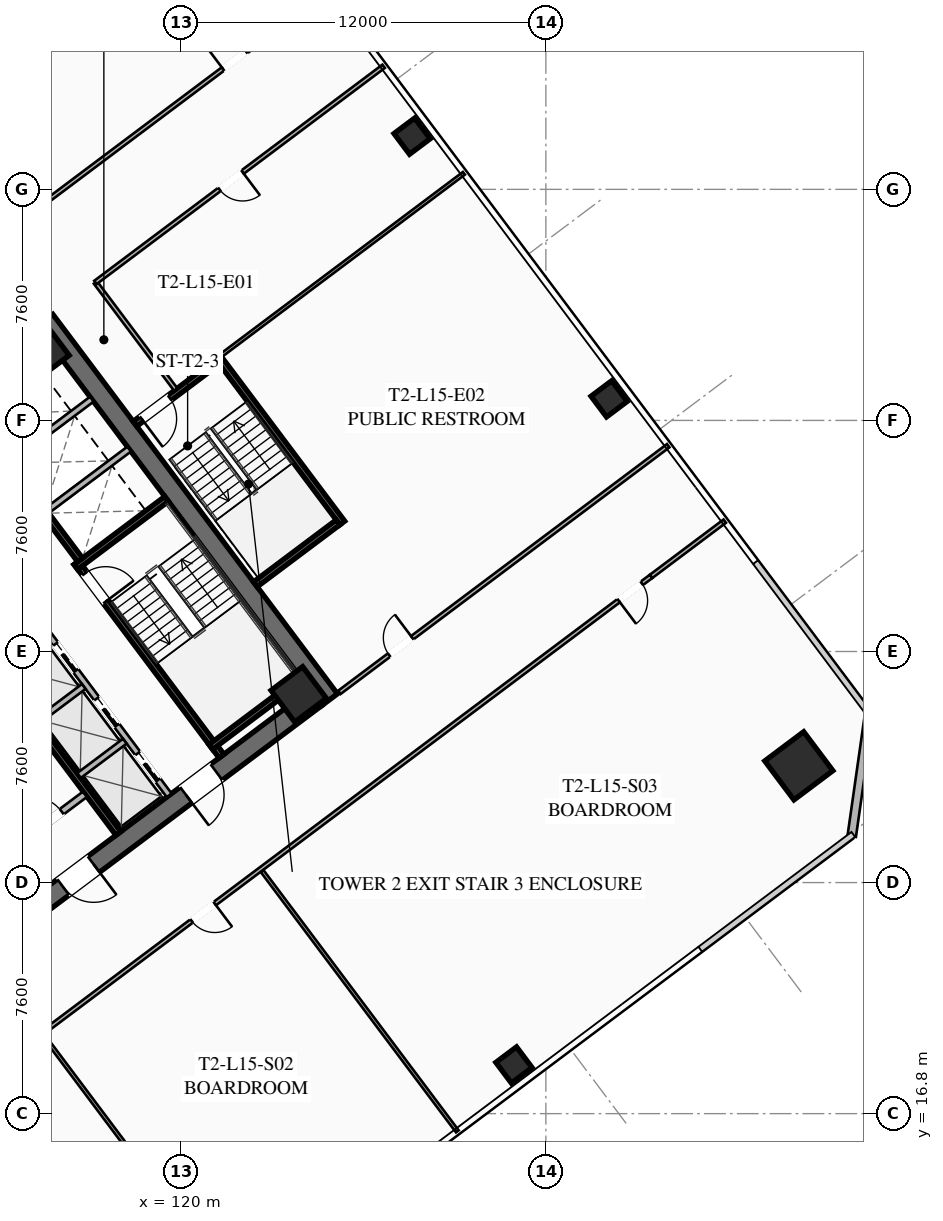
"""IFC4 building model, lengths in metres.
Left out: names, types, materials, properties, quantities, classifications, styles, units other than length and angle.
Written with IfcOpenShell. Run it as: python <this file> out.ifc"""

import sys

from ifc_helpers import new_model, si_unit, direction, frame, frame_2d, origin, origin_2d, place, context, subcontext, project, spatial, rectangle, hollow_rectangle, extrude, element, fill, save


model = new_model("IFC4")
c1 = context("Model", 3, precision=1e-05, world=origin(), true_north=direction((0.0, 1.0)))
c2 = subcontext(c1, "Body", "Model", "MODEL_VIEW")
j1 = project(units=[si_unit("LENGTHUNIT", "METRE"), si_unit("PLANEANGLEUNIT", "RADIAN")], contexts=[c1])
p1 = place(None, origin())
s1 = spatial("IfcSite", under=j1, at=p1, CompositionType="ELEMENT")
p2 = place(p1, origin())
s2 = spatial("IfcBuilding", under=s1, at=p2, CompositionType="ELEMENT")
p3 = place(p2, frame((0.0, 0.0, 60.1)))
s3 = spatial("IfcBuildingStorey", under=s2, at=p3, CompositionType="ELEMENT", Elevation=60.1)
p4 = place(p3, frame((115.524, 42.893, 0.0), z_axis=(0.0, 0.0, 1.0), x_axis=(0.600005007985, -0.799996243986, 0.0)))
e1 = element("IfcWall", 1, at=p4, inside=s3, PredefinedType="SHEAR", context=c2, shape_type="SweptSolid", body=[
    extrude(rectangle(XDim=15.6, YDim=0.65, at=frame_2d((7.8, 0.0))), origin(), (0.0, 0.0, 1.0), 3.55),
])
p5 = place(p3, frame((124.429, 30.478, 0.0), z_axis=(0.0, 0.0, 1.0), x_axis=(-0.799998028465, -0.600002628705, 0.0)))
e2 = element("IfcWall", 2, at=p5, inside=s3, PredefinedType="SHEAR", context=c2, shape_type="SweptSolid", body=[
    extrude(rectangle(XDim=14.86, YDim=0.65, at=frame_2d((7.43, 0.0))), origin(), (0.0, 0.0, 1.0), 3.55),
])
p6 = place(p5, frame((9.13, 0.0, 0.0)))
e3 = element("IfcOpeningElement", 3, at=p6, cuts=e2, PredefinedType="OPENING", context=c2, shape_type="SweptSolid", body=[
    extrude(rectangle(XDim=1.25, YDim=2.25, at=frame_2d((0.625, 1.125))), frame((0.0, 0.335, 0.0), z_axis=(0.0, -1.0, 0.0), x_axis=(1.0, 0.0, 0.0)), (0.0, 0.0, 1.0), 0.67),
])
p7 = place(p5, frame((4.08, 0.0, 0.0)))
e4 = element("IfcOpeningElement", 4, at=p7, cuts=e2, PredefinedType="OPENING", context=c2, shape_type="SweptSolid", body=[
    extrude(rectangle(XDim=1.25, YDim=2.25, at=frame_2d((0.625, 1.125))), frame((0.0, 0.335, 0.0), z_axis=(0.0, -1.0, 0.0), x_axis=(1.0, 0.0, 0.0)), (0.0, 0.0, 1.0), 0.67),
])
for number, where, z_axis, x_axis in (
    (5, (123.87, 30.59, 0.0), (0.0, 0.0, 1.0), (0.8, 0.6, 0.0)),
    (6, (115.41, 41.87, 0.0), (0.0, 0.0, 1.0), (0.8, 0.6, 0.0)),
):
    element("IfcColumn", number, at=place(p3, frame(where, z_axis=z_axis, x_axis=x_axis)), inside=s3, PredefinedType="COLUMN", context=c2, shape_type="SweptSolid", body=[
        extrude(hollow_rectangle(XDim=1.3, YDim=1.3, WallThickness=0.05, at=origin_2d()), origin(), (0.0, 0.0, 1.0), 3.35),
    ])
p8 = place(p3, frame((140.32, 28.24, 0.0), z_axis=(0.0, 0.0, 1.0), x_axis=(0.799999996291, 0.600000004945, 0.0)))
e7 = element("IfcColumn", 7, at=p8, inside=s3, PredefinedType="COLUMN", context=c2, shape_type="SweptSolid", body=[
    extrude(hollow_rectangle(XDim=1.6, YDim=1.6, WallThickness=0.06, at=origin_2d()), origin(), (0.0, 0.0, 1.0), 3.35),
])
for number, where, z_axis, x_axis in (
    (8, (130.95, 18.4, 0.0), (0.0, 0.0, 1.0), (0.8, 0.6, 0.0)),
    (9, (134.08, 40.31, 0.0), (0.0, 0.0, 1.0), (0.8, 0.6, 0.0)),
    (10, (127.6, 48.95, 0.0), (0.0, 0.0, 1.0), (0.8, 0.6, 0.0)),
):
    element("IfcColumn", number, at=place(p3, frame(where, z_axis=z_axis, x_axis=x_axis)), inside=s3, PredefinedType="COLUMN", context=c2, shape_type="SweptSolid", body=[
        extrude(hollow_rectangle(XDim=0.85, YDim=0.85, WallThickness=0.035, at=origin_2d()), origin(), (0.0, 0.0, 1.0), 3.35),
    ])
p9 = place(p3, frame((142.64, 29.98, 0.0), z_axis=(0.0, 0.0, 1.0), x_axis=(-0.14137968631, -0.989955445613, 0.0)))
e11 = element("IfcWall", 11, at=p9, inside=s3, PredefinedType="SOLIDWALL", context=c2, shape_type="SweptSolid", body=[
    extrude(rectangle(XDim=4.101, YDim=0.28, at=frame_2d((2.051, 0.0))), origin(), (0.0, 0.0, 1.0), 3.35),
])
p10 = place(p3, frame((116.56, 34.92, 0.0), z_axis=(0.0, 0.0, 1.0), x_axis=(0.600009827119, -0.799992629566, 0.0)))
e12 = element("IfcWall", 12, at=p10, inside=s3, PredefinedType="SHEAR", context=c2, shape_type="SweptSolid", body=[
    extrude(rectangle(XDim=7.95, YDim=0.2, at=frame_2d((3.975, 0.0))), origin(), (0.0, 0.0, 1.0), 3.35),
])
p11 = place(p10, frame((0.45, 0.0, 0.0)))
e13 = element("IfcOpeningElement", 13, at=p11, cuts=e12, PredefinedType="OPENING", context=c2, shape_type="SweptSolid", body=[
    extrude(rectangle(XDim=1.15, YDim=2.2, at=frame_2d((0.575, 1.1))), frame((0.0, 0.11, 0.0), z_axis=(0.0, -1.0, 0.0), x_axis=(1.0, 0.0, 0.0)), (0.0, 0.0, 1.0), 0.22),
])
for number, where, z_axis, x_axis in (
    (14, (116.54, 34.78, 0.0), (0.0, 0.0, 1.0), (0.8, 0.6, 0.0)),
    (15, (120.98, 28.86, 0.0), (0.0, 0.0, 1.0), (0.8, 0.6, 0.0)),
):
    element("IfcWall", number, at=place(p3, frame(where, z_axis=z_axis, x_axis=x_axis)), inside=s3, PredefinedType="SHEAR", context=c2, shape_type="SweptSolid", body=[
        extrude(rectangle(XDim=3.73, YDim=0.2, at=frame_2d((1.865, 0.0))), origin(), (0.0, 0.0, 1.0), 3.35),
    ])
p12 = place(p3, frame((117.938, 26.016, 0.0), z_axis=(0.0, 0.0, 1.0), x_axis=(-0.600005463273, 0.799995902516, 0.0)))
e16 = element("IfcWall", 16, at=p12, inside=s3, PredefinedType="SHEAR", context=c2, shape_type="SweptSolid", body=[
    extrude(rectangle(XDim=14.3, YDim=0.2, at=frame_2d((7.15, 0.0))), origin(), (0.0, 0.0, 1.0), 3.35),
])
p13 = place(p3, frame((114.316, 25.412, 0.0), z_axis=(0.0, 0.0, 1.0), x_axis=(0.800018601094, 0.59997519774, 0.0)))
e17 = element("IfcWall", 17, at=p13, inside=s3, PredefinedType="SOLIDWALL", context=c2, shape_type="SweptSolid", body=[
    extrude(rectangle(XDim=3.15, YDim=0.22, at=frame_2d((1.575, 0.0))), origin(), (0.0, 0.0, 1.0), 2.703),
])
p14 = place(p13, frame((0.95, 0.0, 0.0)))
e18 = element("IfcOpeningElement", 18, at=p14, cuts=e17, PredefinedType="OPENING", context=c2, shape_type="SweptSolid", body=[
    extrude(rectangle(XDim=1.25, YDim=2.25, at=frame_2d((0.625, 1.125))), frame((0.0, 0.12, 0.0), z_axis=(0.0, -1.0, 0.0), x_axis=(1.0, 0.0, 0.0)), (0.0, 0.0, 1.0), 0.24),
])
p15 = place(p3, frame((112.87, 40.09, 0.0), z_axis=(0.0, 0.0, 1.0), x_axis=(0.599975393228, -0.800018454488, 0.0)))
e19 = element("IfcWall", 19, at=p15, inside=s3, PredefinedType="SHEAR", context=c2, shape_type="SweptSolid", body=[
    extrude(rectangle(XDim=6.35, YDim=0.2, at=frame_2d((3.175, 0.0))), origin(), (0.0, 0.0, 1.0), 3.35),
])
for number, where, z_axis, x_axis in (
    (20, (115.59, 36.63, 0.0), (0.0, 0.0, 1.0), (0.8, 0.6, 0.0)),
    (21, (114.36, 38.27, 0.0), (0.0, 0.0, 1.0), (0.8, 0.6, 0.0)),
):
    element("IfcWall", number, at=place(p3, frame(where, z_axis=z_axis, x_axis=x_axis)), inside=s3, PredefinedType="SOLIDWALL", context=c2, shape_type="SweptSolid", body=[
        extrude(rectangle(XDim=3.38, YDim=0.2, at=frame_2d((1.69, 0.0))), origin(), (0.0, 0.0, 1.0), 3.35),
    ])
p16 = place(p3, frame((119.61, 27.27, 0.0), z_axis=(0.0, 0.0, 1.0), x_axis=(-0.600011488909, 0.79999138319, 0.0)))
e22 = element("IfcWall", 22, at=p16, inside=s3, PredefinedType="SOLIDWALL", context=c2, shape_type="SweptSolid", body=[
    extrude(rectangle(XDim=6.8, YDim=0.2, at=frame_2d((3.4, 0.0))), origin(), (0.0, 0.0, 1.0), 3.35),
])
p17 = place(p16, frame((0.625, 0.0, 0.0)))
e23 = element("IfcOpeningElement", 23, at=p17, cuts=e22, PredefinedType="OPENING", context=c2, shape_type="SweptSolid", body=[
    extrude(rectangle(XDim=1.1, YDim=2.2, at=frame_2d((0.55, 1.1))), frame((0.0, 0.11, 0.0), z_axis=(0.0, -1.0, 0.0), x_axis=(1.0, 0.0, 0.0)), (0.0, 0.0, 1.0), 0.22),
])
p18 = place(p16, frame((2.875, 0.0, 0.0)))
e24 = element("IfcOpeningElement", 24, at=p18, cuts=e22, PredefinedType="OPENING", context=c2, shape_type="SweptSolid", body=[
    extrude(rectangle(XDim=1.1, YDim=2.2, at=frame_2d((0.55, 1.1))), frame((0.0, 0.11, 0.0), z_axis=(0.0, -1.0, 0.0), x_axis=(1.0, 0.0, 0.0)), (0.0, 0.0, 1.0), 0.22),
])
p19 = place(p16, frame((5.125, 0.0, 0.0)))
e25 = element("IfcOpeningElement", 25, at=p19, cuts=e22, PredefinedType="OPENING", context=c2, shape_type="SweptSolid", body=[
    extrude(rectangle(XDim=1.1, YDim=2.2, at=frame_2d((0.55, 1.1))), frame((0.0, 0.11, 0.0), z_axis=(0.0, -1.0, 0.0), x_axis=(1.0, 0.0, 0.0)), (0.0, 0.0, 1.0), 0.22),
])
p20 = place(p3, frame((116.646, 27.922, 0.0), z_axis=(0.0, 0.0, 1.0), x_axis=(0.8, 0.6, 0.0)))
e26 = element("IfcWall", 26, at=p20, inside=s3, PredefinedType="SOLIDWALL", context=c2, shape_type="SweptSolid", body=[
    extrude(rectangle(XDim=1.88, YDim=0.2, at=frame_2d((0.94, 0.0))), origin(), (0.0, 0.0, 1.0), 3.35),
])
p21 = place(p3, frame((115.296, 29.722, 0.0), z_axis=(0.0, 0.0, 1.0), x_axis=(0.799984418148, 0.600020775241, 0.0)))
e27 = element("IfcWall", 27, at=p21, inside=s3, PredefinedType="SOLIDWALL", context=c2, shape_type="SweptSolid", body=[
    extrude(rectangle(XDim=1.88, YDim=0.2, at=frame_2d((0.94, 0.0))), origin(), (0.0, 0.0, 1.0), 3.35),
])
p22 = place(p3, frame((125.304, 36.228, 0.0), z_axis=(0.0, 0.0, 1.0), x_axis=(-0.59998851072, 0.800008616831, 0.0)))
e28 = element("IfcWall", 28, at=p22, inside=s3, PredefinedType="SHEAR", context=c2, shape_type="SweptSolid", body=[
    extrude(rectangle(XDim=6.8, YDim=0.2, at=frame_2d((3.4, 0.0))), origin(), (0.0, 0.0, 1.0), 3.35),
])
p23 = place(p3, frame((121.204, 41.528, 0.0), z_axis=(0.0, 0.0, 1.0), x_axis=(-0.800017232136, -0.599977023131, 0.0)))
e29 = element("IfcWall", 29, at=p23, inside=s3, PredefinedType="SHEAR", context=c2, shape_type="SweptSolid", body=[
    extrude(rectangle(XDim=3.4, YDim=0.2, at=frame_2d((1.7, 0.0))), origin(), (0.0, 0.0, 1.0), 3.35),
])
p24 = place(p23, frame((1.975, 0.0, 0.0)))
e30 = element("IfcOpeningElement", 30, at=p24, cuts=e29, PredefinedType="OPENING", context=c2, shape_type="SweptSolid", body=[
    extrude(rectangle(XDim=1.15, YDim=2.2, at=frame_2d((0.575, 1.1))), frame((0.0, 0.11, 0.0), z_axis=(0.0, -1.0, 0.0), x_axis=(1.0, 0.0, 0.0)), (0.0, 0.0, 1.0), 0.22),
])
p25 = place(p3, frame((122.444, 34.208, 0.0), z_axis=(0.0, 0.0, 1.0), x_axis=(0.79999138319, 0.600011488909, 0.0)))
e31 = element("IfcWall", 31, at=p25, inside=s3, PredefinedType="SHEAR", context=c2, shape_type="SweptSolid", body=[
    extrude(rectangle(XDim=3.4, YDim=0.2, at=frame_2d((1.7, 0.0))), origin(), (0.0, 0.0, 1.0), 3.35),
])
p26 = place(p3, frame((119.824, 40.618, 0.0), z_axis=(0.0, 0.0, 1.0), x_axis=(-0.599982243973, 0.800013316712, 0.0)))
e32 = element("IfcWall", 32, at=p26, inside=s3, PredefinedType="PARTITIONING", context=c2, shape_type="SweptSolid", body=[
    extrude(rectangle(XDim=4.4, YDim=0.135, at=frame_2d((2.2, 0.0))), origin(), (0.0, 0.0, 1.0), 2.703),
])
p27 = place(p3, frame((98.396, 33.922, 0.0), z_axis=(0.0, 0.0, 1.0), x_axis=(0.800001954438, 0.599997394074, 0.0)))
e33 = element("IfcWall", 33, at=p27, inside=s3, PredefinedType="PARTITIONING", context=c2, shape_type="SweptSolid", body=[
    extrude(rectangle(XDim=29.98, YDim=0.135, at=frame_2d((14.99, 0.0))), origin(), (0.0, 0.0, 1.0), 2.703),
])
p28 = place(p27, frame((0.3, 0.0, 0.0)))
e34 = element("IfcOpeningElement", 34, at=p28, cuts=e33, PredefinedType="OPENING", context=c2, shape_type="SweptSolid", body=[
    extrude(rectangle(XDim=0.95, YDim=2.05, at=frame_2d((0.475, 1.025))), frame((0.0, 0.077, 0.0), z_axis=(0.0, -1.0, 0.0), x_axis=(1.0, 0.0, 0.0)), (0.0, 0.0, 1.0), 0.155),
])
p29 = place(p27, frame((11.143, 0.0, 0.0)))
e35 = element("IfcOpeningElement", 35, at=p29, cuts=e33, PredefinedType="OPENING", context=c2, shape_type="SweptSolid", body=[
    extrude(rectangle(XDim=0.95, YDim=2.05, at=frame_2d((0.475, 1.025))), frame((0.0, 0.077, 0.0), z_axis=(0.0, -1.0, 0.0), x_axis=(1.0, 0.0, 0.0)), (0.0, 0.0, 1.0), 0.155),
])
p30 = place(p27, frame((28.73, 0.0, 0.0)))
e36 = element("IfcOpeningElement", 36, at=p30, cuts=e33, PredefinedType="OPENING", context=c2, shape_type="SweptSolid", body=[
    extrude(rectangle(XDim=0.95, YDim=2.05, at=frame_2d((0.475, 1.025))), frame((0.0, 0.077, 0.0), z_axis=(0.0, -1.0, 0.0), x_axis=(1.0, 0.0, 0.0)), (0.0, 0.0, 1.0), 0.155),
])
p31 = place(p3, frame((135.46, 34.47, 0.0), z_axis=(0.0, 0.0, 1.0), x_axis=(-0.799998045563, -0.600002605907, 0.0)))
e37 = element("IfcWall", 37, at=p31, inside=s3, PredefinedType="PARTITIONING", context=c2, shape_type="SweptSolid", body=[
    extrude(rectangle(XDim=29.98, YDim=0.135, at=frame_2d((14.99, 0.0))), origin(), (0.0, 0.0, 1.0), 2.703),
])
p32 = place(p31, frame((28.65, 0.0, 0.0)))
e38 = element("IfcOpeningElement", 38, at=p32, cuts=e37, PredefinedType="OPENING", context=c2, shape_type="SweptSolid", body=[
    extrude(rectangle(XDim=0.95, YDim=2.05, at=frame_2d((0.475, 1.025))), frame((0.0, 0.077, 0.0), z_axis=(0.0, -1.0, 0.0), x_axis=(1.0, 0.0, 0.0)), (0.0, 0.0, 1.0), 0.155),
])
p33 = place(p31, frame((17.938, 0.0, 0.0)))
e39 = element("IfcOpeningElement", 39, at=p33, cuts=e37, PredefinedType="OPENING", context=c2, shape_type="SweptSolid", body=[
    extrude(rectangle(XDim=0.95, YDim=2.05, at=frame_2d((0.475, 1.025))), frame((0.0, 0.077, 0.0), z_axis=(0.0, -1.0, 0.0), x_axis=(1.0, 0.0, 0.0)), (0.0, 0.0, 1.0), 0.155),
])
p34 = place(p31, frame((0.38, 0.0, 0.0)))
e40 = element("IfcOpeningElement", 40, at=p34, cuts=e37, PredefinedType="OPENING", context=c2, shape_type="SweptSolid", body=[
    extrude(rectangle(XDim=0.95, YDim=2.05, at=frame_2d((0.475, 1.025))), frame((0.0, 0.077, 0.0), z_axis=(0.0, -1.0, 0.0), x_axis=(1.0, 0.0, 0.0)), (0.0, 0.0, 1.0), 0.155),
])
p35 = place(p3, frame((135.46, 34.47, 0.0), z_axis=(0.0, 0.0, 1.0), x_axis=(0.799990331366, 0.600012891296, 0.0)))
e41 = element("IfcWall", 41, at=p35, inside=s3, PredefinedType="PARTITIONING", context=c2, shape_type="SweptSolid", body=[
    extrude(rectangle(XDim=3.03, YDim=0.135, at=frame_2d((1.515, 0.0))), origin(), (0.0, 0.0, 1.0), 2.703),
])
p36 = place(p3, frame((121.888, 10.816, 0.0), z_axis=(0.0, 0.0, 1.0), x_axis=(-0.599992698573, 0.800005476018, 0.0)))
e42 = element("IfcWall", 42, at=p36, inside=s3, PredefinedType="PARTITIONING", context=c2, shape_type="SweptSolid", body=[
    extrude(rectangle(XDim=10.7, YDim=0.11, at=frame_2d((5.35, 0.0))), origin(), (0.0, 0.0, 1.0), 2.703),
])
p37 = place(p3, frame((129.088, 16.216, 0.0), z_axis=(0.0, 0.0, 1.0), x_axis=(-0.600003650761, 0.799997261916, 0.0)))
e43 = element("IfcWall", 43, at=p37, inside=s3, PredefinedType="PARTITIONING", context=c2, shape_type="SweptSolid", body=[
    extrude(rectangle(XDim=10.7, YDim=0.11, at=frame_2d((5.35, 0.0))), origin(), (0.0, 0.0, 1.0), 2.703),
])
p38 = place(p3, frame((126.664, 51.248, 0.0), z_axis=(0.0, 0.0, 1.0), x_axis=(-0.799995055373, -0.600006592779, 0.0)))
e44 = element("IfcWall", 44, at=p38, inside=s3, PredefinedType="PARTITIONING", context=c2, shape_type="SweptSolid", body=[
    extrude(rectangle(XDim=11.85, YDim=0.135, at=frame_2d((5.925, 0.0))), origin(), (0.0, 0.0, 1.0), 2.703),
])
p39 = place(p38, frame((5.8, 0.0, 0.0)))
e45 = element("IfcOpeningElement", 45, at=p39, cuts=e44, PredefinedType="OPENING", context=c2, shape_type="SweptSolid", body=[
    extrude(rectangle(XDim=0.95, YDim=2.05, at=frame_2d((0.475, 1.025))), frame((0.0, 0.077, 0.0), z_axis=(0.0, -1.0, 0.0), x_axis=(1.0, 0.0, 0.0)), (0.0, 0.0, 1.0), 0.155),
])
p40 = place(p3, frame((125.208, 30.656, 0.0), z_axis=(0.0, 0.0, 1.0), x_axis=(0.799995666112, 0.600005778473, 0.0)))
e46 = element("IfcWall", 46, at=p40, inside=s3, PredefinedType="PARTITIONING", context=c2, shape_type="SweptSolid", body=[
    extrude(rectangle(XDim=13.52, YDim=0.135, at=frame_2d((6.76, 0.0))), origin(), (0.0, 0.0, 1.0), 2.703),
])
p41 = place(p40, frame((2.045, 0.0, 0.0)))
e47 = element("IfcOpeningElement", 47, at=p41, cuts=e46, PredefinedType="OPENING", context=c2, shape_type="SweptSolid", body=[
    extrude(rectangle(XDim=0.95, YDim=2.05, at=frame_2d((0.475, 1.025))), frame((0.0, 0.077, 0.0), z_axis=(0.0, -1.0, 0.0), x_axis=(1.0, 0.0, 0.0)), (0.0, 0.0, 1.0), 0.155),
])
p42 = place(p3, frame((129.304, 47.728, 0.0), z_axis=(0.0, 0.0, 1.0), x_axis=(-0.8, -0.6, 0.0)))
e48 = element("IfcWall", 48, at=p42, inside=s3, PredefinedType="PARTITIONING", context=c2, shape_type="SweptSolid", body=[
    extrude(rectangle(XDim=10.0, YDim=0.11, at=frame_2d((5.0, 0.0))), origin(), (0.0, 0.0, 1.0), 2.703),
])
p43 = place(p6, origin())
e49 = element("IfcDoor", 49, at=p43, inside=s3, OperationType="SINGLE_SWING_LEFT", PredefinedType="DOOR", context=c2, shape_type="SweptSolid", body=[
    extrude(rectangle(XDim=1.25, YDim=2.25, at=frame_2d((0.625, 1.125))), frame((0.0, 0.025, 0.0), z_axis=(0.0, -1.0, 0.0), x_axis=(1.0, 0.0, 0.0)), (0.0, 0.0, 1.0), 0.05),
])
fill(e3, e49)
p44 = place(p7, origin())
e50 = element("IfcDoor", 50, at=p44, inside=s3, OperationType="SINGLE_SWING_RIGHT", PredefinedType="DOOR", context=c2, shape_type="SweptSolid", body=[
    extrude(rectangle(XDim=1.25, YDim=2.25, at=frame_2d((0.625, 1.125))), frame((0.0, 0.025, 0.0), z_axis=(0.0, -1.0, 0.0), x_axis=(1.0, 0.0, 0.0)), (0.0, 0.0, 1.0), 0.05),
])
fill(e4, e50)
p45 = place(p11, origin())
e51 = element("IfcDoor", 51, at=p45, inside=s3, OperationType="SINGLE_SWING_RIGHT", PredefinedType="DOOR", context=c2, shape_type="SweptSolid", body=[
    extrude(rectangle(XDim=1.15, YDim=2.2, at=frame_2d((0.575, 1.1))), frame((0.0, 0.025, 0.0), z_axis=(0.0, -1.0, 0.0), x_axis=(1.0, 0.0, 0.0)), (0.0, 0.0, 1.0), 0.05),
])
fill(e13, e51)
p46 = place(p14, origin())
e52 = element("IfcDoor", 52, at=p46, inside=s3, OperationType="SINGLE_SWING_LEFT", PredefinedType="DOOR", context=c2, shape_type="SweptSolid", body=[
    extrude(rectangle(XDim=1.25, YDim=2.25, at=frame_2d((0.625, 1.125))), frame((0.0, 0.025, 0.0), z_axis=(0.0, -1.0, 0.0), x_axis=(1.0, 0.0, 0.0)), (0.0, 0.0, 1.0), 0.05),
])
fill(e18, e52)
p47 = place(p24, origin())
e53 = element("IfcDoor", 53, at=p47, inside=s3, OperationType="SINGLE_SWING_RIGHT", PredefinedType="DOOR", context=c2, shape_type="SweptSolid", body=[
    extrude(rectangle(XDim=1.15, YDim=2.2, at=frame_2d((0.575, 1.1))), frame((0.0, 0.025, 0.0), z_axis=(0.0, -1.0, 0.0), x_axis=(1.0, 0.0, 0.0)), (0.0, 0.0, 1.0), 0.05),
])
fill(e30, e53)
p48 = place(p30, origin())
e54 = element("IfcDoor", 54, at=p48, inside=s3, OperationType="SINGLE_SWING_LEFT", PredefinedType="DOOR", context=c2, shape_type="SweptSolid", body=[
    extrude(rectangle(XDim=0.95, YDim=2.05, at=frame_2d((0.475, 1.025))), frame((0.0, 0.025, 0.0), z_axis=(0.0, -1.0, 0.0), x_axis=(1.0, 0.0, 0.0)), (0.0, 0.0, 1.0), 0.05),
])
fill(e36, e54)
p49 = place(p33, origin())
e55 = element("IfcDoor", 55, at=p49, inside=s3, OperationType="SINGLE_SWING_LEFT", PredefinedType="DOOR", context=c2, shape_type="SweptSolid", body=[
    extrude(rectangle(XDim=0.95, YDim=2.05, at=frame_2d((0.475, 1.025))), frame((0.0, 0.025, 0.0), z_axis=(0.0, -1.0, 0.0), x_axis=(1.0, 0.0, 0.0)), (0.0, 0.0, 1.0), 0.05),
])
fill(e39, e55)
p50 = place(p34, origin())
e56 = element("IfcDoor", 56, at=p50, inside=s3, OperationType="SINGLE_SWING_RIGHT", PredefinedType="DOOR", context=c2, shape_type="SweptSolid", body=[
    extrude(rectangle(XDim=0.95, YDim=2.05, at=frame_2d((0.475, 1.025))), frame((0.0, 0.025, 0.0), z_axis=(0.0, -1.0, 0.0), x_axis=(1.0, 0.0, 0.0)), (0.0, 0.0, 1.0), 0.05),
])
fill(e40, e56)
p51 = place(p39, origin())
e57 = element("IfcDoor", 57, at=p51, inside=s3, OperationType="SINGLE_SWING_LEFT", PredefinedType="DOOR", context=c2, shape_type="SweptSolid", body=[
    extrude(rectangle(XDim=0.95, YDim=2.05, at=frame_2d((0.475, 1.025))), frame((0.0, 0.025, 0.0), z_axis=(0.0, -1.0, 0.0), x_axis=(1.0, 0.0, 0.0)), (0.0, 0.0, 1.0), 0.05),
])
fill(e45, e57)
p52 = place(p41, origin())
e58 = element("IfcDoor", 58, at=p52, inside=s3, OperationType="SINGLE_SWING_RIGHT", PredefinedType="DOOR", context=c2, shape_type="SweptSolid", body=[
    extrude(rectangle(XDim=0.95, YDim=2.05, at=frame_2d((0.475, 1.025))), frame((0.0, 0.025, 0.0), z_axis=(0.0, -1.0, 0.0), x_axis=(1.0, 0.0, 0.0)), (0.0, 0.0, 1.0), 0.05),
])
fill(e47, e58)
p53 = place(p17, origin())
e59 = element("IfcDoor", 59, at=p53, inside=s3, OperationType="SLIDING_TO_LEFT", PredefinedType="DOOR", context=c2, shape_type="SweptSolid", body=[
    extrude(rectangle(XDim=1.1, YDim=2.2, at=frame_2d((0.55, 1.1))), frame((0.0, 0.025, 0.0), z_axis=(0.0, -1.0, 0.0), x_axis=(1.0, 0.0, 0.0)), (0.0, 0.0, 1.0), 0.05),
])
fill(e23, e59)
p54 = place(p18, origin())
e60 = element("IfcDoor", 60, at=p54, inside=s3, OperationType="SLIDING_TO_LEFT", PredefinedType="DOOR", context=c2, shape_type="SweptSolid", body=[
    extrude(rectangle(XDim=1.1, YDim=2.2, at=frame_2d((0.55, 1.1))), frame((0.0, 0.025, 0.0), z_axis=(0.0, -1.0, 0.0), x_axis=(1.0, 0.0, 0.0)), (0.0, 0.0, 1.0), 0.05),
])
fill(e24, e60)
p55 = place(p19, origin())
e61 = element("IfcDoor", 61, at=p55, inside=s3, OperationType="SLIDING_TO_LEFT", PredefinedType="DOOR", context=c2, shape_type="SweptSolid", body=[
    extrude(rectangle(XDim=1.1, YDim=2.2, at=frame_2d((0.55, 1.1))), frame((0.0, 0.025, 0.0), z_axis=(0.0, -1.0, 0.0), x_axis=(1.0, 0.0, 0.0)), (0.0, 0.0, 1.0), 0.05),
])
fill(e25, e61)
save(model, sys.argv[1])
